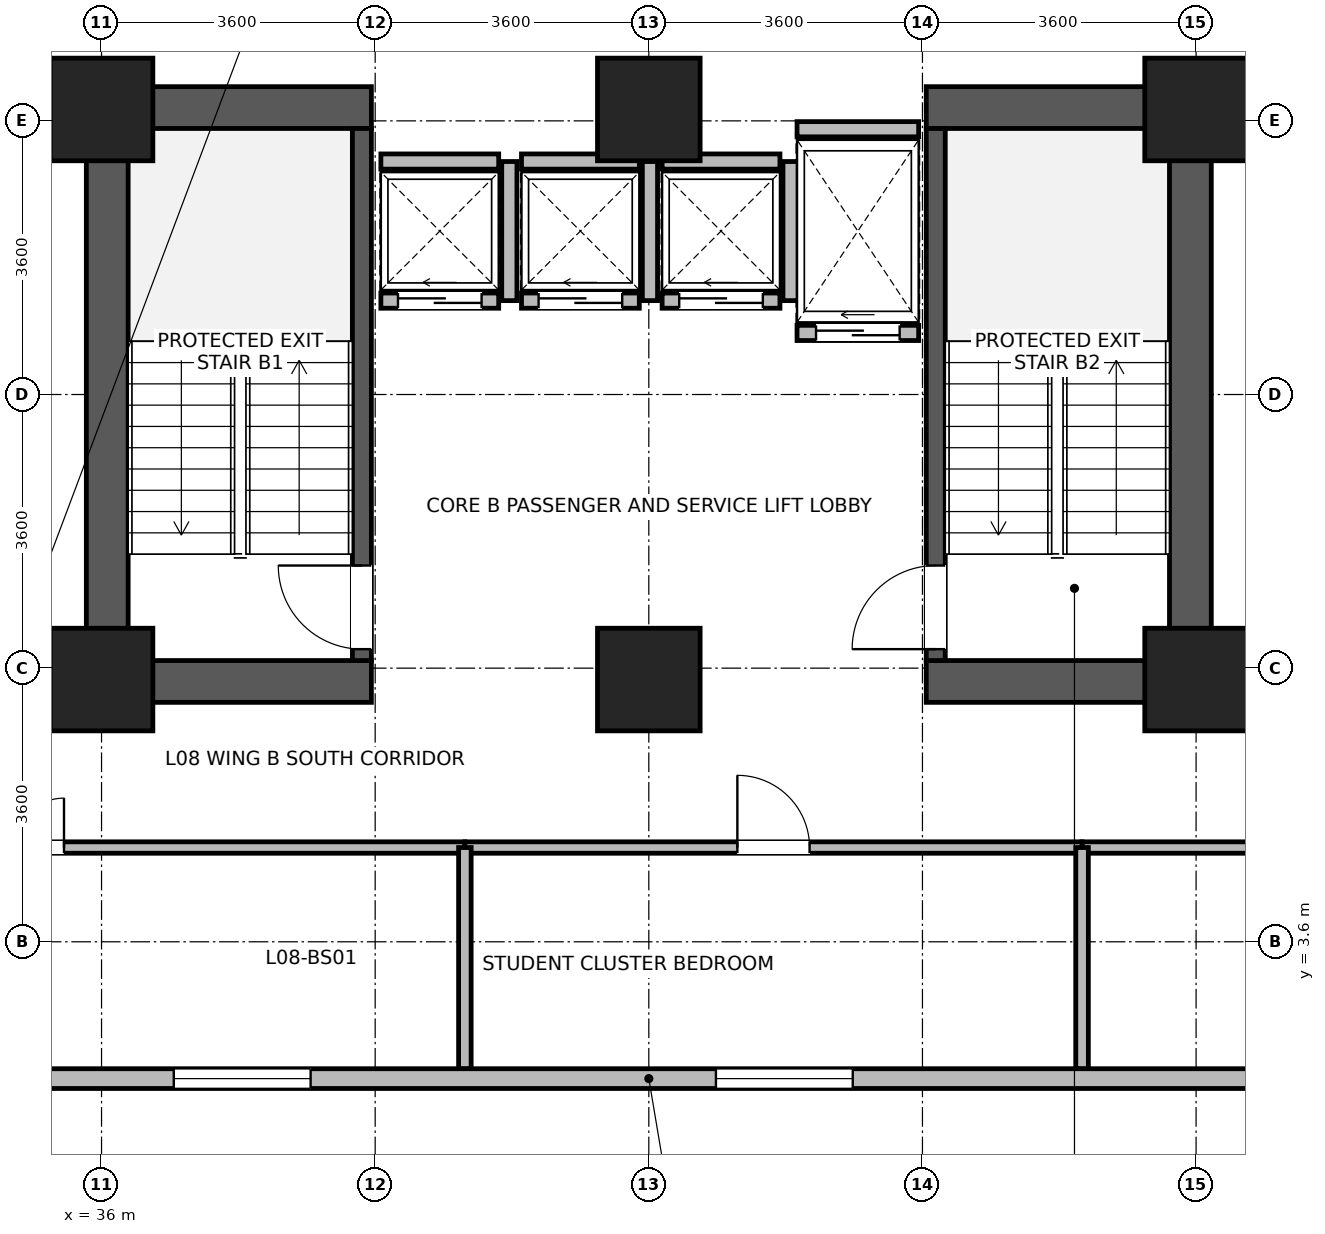
"""IFC4 building model, lengths in metres.
Left out: names, types, materials, properties, quantities, classifications, styles, units other than length and angle.
Written with IfcOpenShell. Run it as: python <this file> out.ifc"""

import sys

from ifc_helpers import new_model, si_unit, direction, frame, frame_2d, origin, origin_2d, place, context, subcontext, project, spatial, rectangle, extrude, source, transform, mapped, element, fill, save


model = new_model("IFC4")
c1 = context("Model", 3, precision=1e-05, world=origin(), true_north=direction((0.0, 1.0)))
c2 = subcontext(c1, "Body", "Model", "MODEL_VIEW")
j1 = project(units=[si_unit("LENGTHUNIT", "METRE"), si_unit("PLANEANGLEUNIT", "RADIAN")], contexts=[c1])
p1 = place(None, origin())
s1 = spatial("IfcSite", under=j1, at=p1, CompositionType="ELEMENT")
p2 = place(p1, origin())
s2 = spatial("IfcBuilding", under=s1, at=p2, CompositionType="ELEMENT")
p3 = place(p2, frame((0.0, 0.0, 36.4)))
s3 = spatial("IfcBuildingStorey", under=s2, at=p3, CompositionType="ELEMENT", Elevation=36.4)
for number, where, z_axis, x_axis in (
    (1, (36.075, 6.75, 0.0), (0.0, 0.0, 1.0), (0.0, 1.0, 0.0)),
    (2, (50.325, 6.75, 0.0), (0.0, 0.0, 1.0), (0.0, 1.0, 0.0)),
):
    element("IfcWall", number, at=place(p3, frame(where, z_axis=z_axis, x_axis=x_axis)), inside=s3, PredefinedType="SHEAR", context=c2, shape_type="SweptSolid", body=[
        extrude(rectangle(XDim=8.1, YDim=0.55, at=frame_2d((4.05, 0.0))), origin(), (0.0, 0.0, 1.0), 3.45),
    ])
for number, where, z_axis, x_axis in (
    (3, (36.35, 7.025, 0.0), (0.0, 0.0, 1.0), (1.0, 0.0, 0.0)),
    (4, (46.85, 7.025, 0.0), (0.0, 0.0, 1.0), (1.0, 0.0, 0.0)),
    (5, (36.35, 14.575, 0.0), (0.0, 0.0, 1.0), (1.0, 0.0, 0.0)),
    (6, (46.85, 14.575, 0.0), (0.0, 0.0, 1.0), (1.0, 0.0, 0.0)),
):
    element("IfcWall", number, at=place(p3, frame(where, z_axis=z_axis, x_axis=x_axis)), inside=s3, PredefinedType="SHEAR", context=c2, shape_type="SweptSolid", body=[
        extrude(rectangle(XDim=3.2, YDim=0.55, at=frame_2d((1.6, 0.0))), origin(), (0.0, 0.0, 1.0), 3.45),
    ])
p4 = place(p3, frame((39.425, 7.3, 0.0), z_axis=(0.0, 0.0, 1.0), x_axis=(0.0, 1.0, 0.0)))
e7 = element("IfcWall", 7, at=p4, inside=s3, PredefinedType="SHEAR", context=c2, shape_type="SweptSolid", body=[
    extrude(rectangle(XDim=7.0, YDim=0.25, at=frame_2d((3.5, 0.0))), origin(), (0.0, 0.0, 1.0), 3.45),
])
p5 = place(p4, frame((0.15, 0.0, 0.0)))
e8 = element("IfcOpeningElement", 8, at=p5, cuts=e7, PredefinedType="OPENING", context=c2, shape_type="SweptSolid", body=[
    extrude(rectangle(XDim=1.1, YDim=2.08, at=frame_2d((0.55, 1.04))), frame((0.0, 0.135, 0.0), z_axis=(0.0, -1.0, 0.0), x_axis=(1.0, 0.0, 0.0)), (0.0, 0.0, 1.0), 0.27),
])
p6 = place(p3, frame((46.975, 7.3, 0.0), z_axis=(0.0, 0.0, 1.0), x_axis=(0.0, 1.0, 0.0)))
e9 = element("IfcWall", 9, at=p6, inside=s3, PredefinedType="SHEAR", context=c2, shape_type="SweptSolid", body=[
    extrude(rectangle(XDim=7.0, YDim=0.25, at=frame_2d((3.5, 0.0))), origin(), (0.0, 0.0, 1.0), 3.45),
])
p7 = place(p6, frame((0.15, 0.0, 0.0)))
e10 = element("IfcOpeningElement", 10, at=p7, cuts=e9, PredefinedType="OPENING", context=c2, shape_type="SweptSolid", body=[
    extrude(rectangle(XDim=1.1, YDim=2.08, at=frame_2d((0.55, 1.04))), frame((0.0, 0.135, 0.0), z_axis=(0.0, -1.0, 0.0), x_axis=(1.0, 0.0, 0.0)), (0.0, 0.0, 1.0), 0.27),
])
m1 = source(origin(), c2, "Body", "SweptSolid", [
    extrude(rectangle(XDim=1.35, YDim=1.35, at=origin_2d()), origin(), (0.0, 0.0, 1.0), 3.7),
])
for number, where, z_axis, x_axis in (
    (11, (36.0, 7.05, 0.0), (0.0, 0.0, 1.0), (1.0, 0.0, 0.0)),
    (12, (36.0, 14.55, 0.0), (0.0, 0.0, 1.0), (1.0, 0.0, 0.0)),
    (13, (43.2, 7.05, 0.0), (0.0, 0.0, 1.0), (1.0, 0.0, 0.0)),
    (14, (43.2, 14.55, 0.0), (0.0, 0.0, 1.0), (1.0, 0.0, 0.0)),
    (15, (50.4, 7.05, 0.0), (0.0, 0.0, 1.0), (1.0, 0.0, 0.0)),
    (16, (50.4, 14.55, 0.0), (0.0, 0.0, 1.0), (1.0, 0.0, 0.0)),
):
    element("IfcColumn", number, at=place(p3, frame(where, z_axis=z_axis, x_axis=x_axis)), inside=s3, PredefinedType="COLUMN", context=c2, shape_type="MappedRepresentation", body=[
        mapped(m1, transform((0.0, 0.0, 0.0), x_axis=(1.0, 0.0, 0.0), y_axis=(0.0, 1.0, 0.0), z_axis=(0.0, 0.0, 1.0), scale=1.0)),
    ])
p8 = place(p3, frame((57.465, 1.8, 0.0), z_axis=(0.0, 0.0, 1.0), x_axis=(-1.0, 0.0, 0.0)))
e17 = element("IfcWall", 17, at=p8, inside=s3, PredefinedType="STANDARD", context=c2, shape_type="SweptSolid", body=[
    extrude(rectangle(XDim=28.53, YDim=0.26, at=frame_2d((14.265, 0.0))), origin(), (0.0, 0.0, 1.0), 3.43),
])
p9 = place(p8, frame((0.883, 0.0, 0.85)))
e18 = element("IfcOpeningElement", 18, at=p9, cuts=e17, PredefinedType="OPENING", context=c2, shape_type="SweptSolid", body=[
    extrude(rectangle(XDim=1.8, YDim=1.85, at=frame_2d((0.9, 0.925))), frame((0.0, 0.14, 0.0), z_axis=(0.0, -1.0, 0.0), x_axis=(1.0, 0.0, 0.0)), (0.0, 0.0, 1.0), 0.28),
])
p10 = place(p8, frame((4.449, 0.0, 0.85)))
e19 = element("IfcOpeningElement", 19, at=p10, cuts=e17, PredefinedType="OPENING", context=c2, shape_type="SweptSolid", body=[
    extrude(rectangle(XDim=1.8, YDim=1.85, at=frame_2d((0.9, 0.925))), frame((0.0, 0.14, 0.0), z_axis=(0.0, -1.0, 0.0), x_axis=(1.0, 0.0, 0.0)), (0.0, 0.0, 1.0), 0.28),
])
p11 = place(p8, frame((11.582, 0.0, 0.85)))
e20 = element("IfcOpeningElement", 20, at=p11, cuts=e17, PredefinedType="OPENING", context=c2, shape_type="SweptSolid", body=[
    extrude(rectangle(XDim=1.8, YDim=1.85, at=frame_2d((0.9, 0.925))), frame((0.0, 0.14, 0.0), z_axis=(0.0, -1.0, 0.0), x_axis=(1.0, 0.0, 0.0)), (0.0, 0.0, 1.0), 0.28),
])
p12 = place(p8, frame((18.714, 0.0, 0.85)))
e21 = element("IfcOpeningElement", 21, at=p12, cuts=e17, PredefinedType="OPENING", context=c2, shape_type="SweptSolid", body=[
    extrude(rectangle(XDim=1.8, YDim=1.85, at=frame_2d((0.9, 0.925))), frame((0.0, 0.14, 0.0), z_axis=(0.0, -1.0, 0.0), x_axis=(1.0, 0.0, 0.0)), (0.0, 0.0, 1.0), 0.28),
])
p13 = place(p8, frame((22.281, 0.0, 0.85)))
e22 = element("IfcOpeningElement", 22, at=p13, cuts=e17, PredefinedType="OPENING", context=c2, shape_type="SweptSolid", body=[
    extrude(rectangle(XDim=1.8, YDim=1.85, at=frame_2d((0.9, 0.925))), frame((0.0, 0.14, 0.0), z_axis=(0.0, -1.0, 0.0), x_axis=(1.0, 0.0, 0.0)), (0.0, 0.0, 1.0), 0.28),
])
p14 = place(p8, frame((25.847, 0.0, 0.85)))
e23 = element("IfcOpeningElement", 23, at=p14, cuts=e17, PredefinedType="OPENING", context=c2, shape_type="SweptSolid", body=[
    extrude(rectangle(XDim=1.8, YDim=1.85, at=frame_2d((0.9, 0.925))), frame((0.0, 0.14, 0.0), z_axis=(0.0, -1.0, 0.0), x_axis=(1.0, 0.0, 0.0)), (0.0, 0.0, 1.0), 0.28),
])
p15 = place(p3, frame((39.675, 12.035, 0.0), z_axis=(0.0, 0.0, 1.0), x_axis=(1.0, 0.0, 0.0)))
e24 = element("IfcWall", 24, at=p15, inside=s3, PredefinedType="PARTITIONING", context=c2, shape_type="SweptSolid", body=[
    extrude(rectangle(XDim=1.55, YDim=0.2, at=frame_2d((0.775, 0.0))), origin(), (0.0, 0.0, 1.0), 3.43),
])
p16 = place(p15, frame((0.225, 0.0, 0.0)))
e25 = element("IfcOpeningElement", 25, at=p16, cuts=e24, PredefinedType="OPENING", context=c2, shape_type="SweptSolid", body=[
    extrude(rectangle(XDim=1.1, YDim=2.12, at=frame_2d((0.55, 1.06))), frame((0.0, 0.11, 0.0), z_axis=(0.0, -1.0, 0.0), x_axis=(1.0, 0.0, 0.0)), (0.0, 0.0, 1.0), 0.22),
])
p17 = place(p3, frame((39.675, 13.865, 0.0), z_axis=(0.0, 0.0, 1.0), x_axis=(1.0, 0.0, 0.0)))
e26 = element("IfcWall", 26, at=p17, inside=s3, PredefinedType="PARTITIONING", context=c2, shape_type="SweptSolid", body=[
    extrude(rectangle(XDim=1.55, YDim=0.2, at=frame_2d((0.775, 0.0))), origin(), (0.0, 0.0, 1.0), 3.43),
])
p18 = place(p3, frame((41.365, 12.035, 0.0), z_axis=(0.0, 0.0, 1.0), x_axis=(0.0, 1.0, 0.0)))
e27 = element("IfcWall", 27, at=p18, inside=s3, PredefinedType="PARTITIONING", context=c2, shape_type="SweptSolid", body=[
    extrude(rectangle(XDim=1.83, YDim=0.2, at=frame_2d((0.915, 0.0))), origin(), (0.0, 0.0, 1.0), 3.43),
])
p19 = place(p3, frame((41.525, 12.035, 0.0), z_axis=(0.0, 0.0, 1.0), x_axis=(1.0, 0.0, 0.0)))
e28 = element("IfcWall", 28, at=p19, inside=s3, PredefinedType="PARTITIONING", context=c2, shape_type="SweptSolid", body=[
    extrude(rectangle(XDim=1.55, YDim=0.2, at=frame_2d((0.775, 0.0))), origin(), (0.0, 0.0, 1.0), 3.43),
])
p20 = place(p19, frame((0.225, 0.0, 0.0)))
e29 = element("IfcOpeningElement", 29, at=p20, cuts=e28, PredefinedType="OPENING", context=c2, shape_type="SweptSolid", body=[
    extrude(rectangle(XDim=1.1, YDim=2.12, at=frame_2d((0.55, 1.06))), frame((0.0, 0.11, 0.0), z_axis=(0.0, -1.0, 0.0), x_axis=(1.0, 0.0, 0.0)), (0.0, 0.0, 1.0), 0.22),
])
p21 = place(p3, frame((41.525, 13.865, 0.0), z_axis=(0.0, 0.0, 1.0), x_axis=(1.0, 0.0, 0.0)))
e30 = element("IfcWall", 30, at=p21, inside=s3, PredefinedType="PARTITIONING", context=c2, shape_type="SweptSolid", body=[
    extrude(rectangle(XDim=1.55, YDim=0.2, at=frame_2d((0.775, 0.0))), origin(), (0.0, 0.0, 1.0), 3.43),
])
p22 = place(p3, frame((43.215, 12.035, 0.0), z_axis=(0.0, 0.0, 1.0), x_axis=(0.0, 1.0, 0.0)))
e31 = element("IfcWall", 31, at=p22, inside=s3, PredefinedType="PARTITIONING", context=c2, shape_type="SweptSolid", body=[
    extrude(rectangle(XDim=1.83, YDim=0.2, at=frame_2d((0.915, 0.0))), origin(), (0.0, 0.0, 1.0), 3.43),
])
p23 = place(p3, frame((43.375, 12.035, 0.0), z_axis=(0.0, 0.0, 1.0), x_axis=(1.0, 0.0, 0.0)))
e32 = element("IfcWall", 32, at=p23, inside=s3, PredefinedType="PARTITIONING", context=c2, shape_type="SweptSolid", body=[
    extrude(rectangle(XDim=1.55, YDim=0.2, at=frame_2d((0.775, 0.0))), origin(), (0.0, 0.0, 1.0), 3.43),
])
p24 = place(p23, frame((0.225, 0.0, 0.0)))
e33 = element("IfcOpeningElement", 33, at=p24, cuts=e32, PredefinedType="OPENING", context=c2, shape_type="SweptSolid", body=[
    extrude(rectangle(XDim=1.1, YDim=2.12, at=frame_2d((0.55, 1.06))), frame((0.0, 0.11, 0.0), z_axis=(0.0, -1.0, 0.0), x_axis=(1.0, 0.0, 0.0)), (0.0, 0.0, 1.0), 0.22),
])
p25 = place(p3, frame((43.375, 13.865, 0.0), z_axis=(0.0, 0.0, 1.0), x_axis=(1.0, 0.0, 0.0)))
e34 = element("IfcWall", 34, at=p25, inside=s3, PredefinedType="PARTITIONING", context=c2, shape_type="SweptSolid", body=[
    extrude(rectangle(XDim=1.55, YDim=0.2, at=frame_2d((0.775, 0.0))), origin(), (0.0, 0.0, 1.0), 3.43),
])
p26 = place(p3, frame((45.065, 12.035, 0.0), z_axis=(0.0, 0.0, 1.0), x_axis=(0.0, 1.0, 0.0)))
e35 = element("IfcWall", 35, at=p26, inside=s3, PredefinedType="PARTITIONING", context=c2, shape_type="SweptSolid", body=[
    extrude(rectangle(XDim=1.83, YDim=0.2, at=frame_2d((0.915, 0.0))), origin(), (0.0, 0.0, 1.0), 3.43),
])
p27 = place(p3, frame((45.15, 11.61, 0.0), z_axis=(0.0, 0.0, 1.0), x_axis=(1.0, 0.0, 0.0)))
e36 = element("IfcWall", 36, at=p27, inside=s3, PredefinedType="PARTITIONING", context=c2, shape_type="SweptSolid", body=[
    extrude(rectangle(XDim=1.6, YDim=0.2, at=frame_2d((0.8, 0.0))), origin(), (0.0, 0.0, 1.0), 3.43),
])
p28 = place(p27, frame((0.25, 0.0, 0.0)))
e37 = element("IfcOpeningElement", 37, at=p28, cuts=e36, PredefinedType="OPENING", context=c2, shape_type="SweptSolid", body=[
    extrude(rectangle(XDim=1.1, YDim=2.12, at=frame_2d((0.55, 1.06))), frame((0.0, 0.11, 0.0), z_axis=(0.0, -1.0, 0.0), x_axis=(1.0, 0.0, 0.0)), (0.0, 0.0, 1.0), 0.22),
])
p29 = place(p3, frame((45.15, 14.29, 0.0), z_axis=(0.0, 0.0, 1.0), x_axis=(1.0, 0.0, 0.0)))
e38 = element("IfcWall", 38, at=p29, inside=s3, PredefinedType="PARTITIONING", context=c2, shape_type="SweptSolid", body=[
    extrude(rectangle(XDim=1.6, YDim=0.2, at=frame_2d((0.8, 0.0))), origin(), (0.0, 0.0, 1.0), 2.23),
])
p30 = place(p3, frame((28.932, 4.84, 0.0), z_axis=(0.0, 0.0, 1.0), x_axis=(1.0, 0.0, 0.0)))
e39 = element("IfcWall", 39, at=p30, inside=s3, PredefinedType="PARTITIONING", context=c2, shape_type="SweptSolid", body=[
    extrude(rectangle(XDim=11.848, YDim=0.15, at=frame_2d((5.924, 0.0))), origin(), (0.0, 0.0, 1.0), 3.43),
])
p31 = place(p30, frame((5.274, 0.0, 0.0)))
e40 = element("IfcOpeningElement", 40, at=p31, cuts=e39, PredefinedType="OPENING", context=c2, shape_type="SweptSolid", body=[
    extrude(rectangle(XDim=1.3, YDim=2.12, at=frame_2d((0.65, 1.06))), frame((0.0, 0.085, 0.0), z_axis=(0.0, -1.0, 0.0), x_axis=(1.0, 0.0, 0.0)), (0.0, 0.0, 1.0), 0.17),
])
p32 = place(p3, frame((48.9, 4.84, 0.0), z_axis=(0.0, 0.0, 1.0), x_axis=(1.0, 0.0, 0.0)))
e41 = element("IfcWall", 41, at=p32, inside=s3, PredefinedType="PARTITIONING", context=c2, shape_type="SweptSolid", body=[
    extrude(rectangle(XDim=8.568, YDim=0.15, at=frame_2d((4.284, 0.0))), origin(), (0.0, 0.0, 1.0), 3.43),
])
p33 = place(p32, frame((3.809, 0.0, 0.0)))
e42 = element("IfcOpeningElement", 42, at=p33, cuts=e41, PredefinedType="OPENING", context=c2, shape_type="SweptSolid", body=[
    extrude(rectangle(XDim=0.95, YDim=2.1, at=frame_2d((0.475, 1.05))), frame((0.0, 0.085, 0.0), z_axis=(0.0, -1.0, 0.0), x_axis=(1.0, 0.0, 0.0)), (0.0, 0.0, 1.0), 0.17),
])
p34 = place(p3, frame((40.78, 4.84, 0.0), z_axis=(0.0, 0.0, 1.0), x_axis=(1.0, 0.0, 0.0)))
e43 = element("IfcWall", 43, at=p34, inside=s3, PredefinedType="PARTITIONING", context=c2, shape_type="SweptSolid", body=[
    extrude(rectangle(XDim=8.12, YDim=0.15, at=frame_2d((4.06, 0.0))), origin(), (0.0, 0.0, 1.0), 3.43),
])
p35 = place(p34, frame((3.585, 0.0, 0.0)))
e44 = element("IfcOpeningElement", 44, at=p35, cuts=e43, PredefinedType="OPENING", context=c2, shape_type="SweptSolid", body=[
    extrude(rectangle(XDim=0.95, YDim=2.1, at=frame_2d((0.475, 1.05))), frame((0.0, 0.085, 0.0), z_axis=(0.0, -1.0, 0.0), x_axis=(1.0, 0.0, 0.0)), (0.0, 0.0, 1.0), 0.17),
])
for number, where, z_axis, x_axis in (
    (45, (40.78, 1.932, 0.0), (0.0, 0.0, 1.0), (0.0, 1.0, 0.0)),
    (46, (48.9, 1.932, 0.0), (0.0, 0.0, 1.0), (0.0, 1.0, 0.0)),
):
    element("IfcWall", number, at=place(p3, frame(where, z_axis=z_axis, x_axis=x_axis)), inside=s3, PredefinedType="PARTITIONING", context=c2, shape_type="SweptSolid", body=[
        extrude(rectangle(XDim=2.908, YDim=0.165, at=frame_2d((1.454, 0.0))), origin(), (0.0, 0.0, 1.0), 3.43),
    ])
p36 = place(p11, origin())
e47 = element("IfcWindow", 47, at=p36, inside=s3, PartitioningType="SINGLE_PANEL", PredefinedType="WINDOW", context=c2, shape_type="SweptSolid", body=[
    extrude(rectangle(XDim=1.8, YDim=1.85, at=frame_2d((0.9, 0.925))), frame((0.0, 0.03, 0.0), z_axis=(0.0, -1.0, 0.0), x_axis=(1.0, 0.0, 0.0)), (0.0, 0.0, 1.0), 0.06),
])
fill(e20, e47)
p37 = place(p12, origin())
e48 = element("IfcWindow", 48, at=p37, inside=s3, PartitioningType="SINGLE_PANEL", PredefinedType="WINDOW", context=c2, shape_type="SweptSolid", body=[
    extrude(rectangle(XDim=1.8, YDim=1.85, at=frame_2d((0.9, 0.925))), frame((0.0, 0.03, 0.0), z_axis=(0.0, -1.0, 0.0), x_axis=(1.0, 0.0, 0.0)), (0.0, 0.0, 1.0), 0.06),
])
fill(e21, e48)
p38 = place(p5, origin())
e49 = element("IfcDoor", 49, at=p38, inside=s3, OperationType="SINGLE_SWING_RIGHT", PredefinedType="DOOR", context=c2, shape_type="SweptSolid", body=[
    extrude(rectangle(XDim=1.1, YDim=2.08, at=frame_2d((0.55, 1.04))), frame((0.0, 0.025, 0.0), z_axis=(0.0, -1.0, 0.0), x_axis=(1.0, 0.0, 0.0)), (0.0, 0.0, 1.0), 0.05),
])
fill(e8, e49)
p39 = place(p7, origin())
e50 = element("IfcDoor", 50, at=p39, inside=s3, OperationType="SINGLE_SWING_LEFT", PredefinedType="DOOR", context=c2, shape_type="SweptSolid", body=[
    extrude(rectangle(XDim=1.1, YDim=2.08, at=frame_2d((0.55, 1.04))), frame((0.0, 0.025, 0.0), z_axis=(0.0, -1.0, 0.0), x_axis=(1.0, 0.0, 0.0)), (0.0, 0.0, 1.0), 0.05),
])
fill(e10, e50)
p40 = place(p16, origin())
e51 = element("IfcDoor", 51, at=p40, inside=s3, OperationType="SLIDING_TO_LEFT", PredefinedType="DOOR", context=c2, shape_type="SweptSolid", body=[
    extrude(rectangle(XDim=1.1, YDim=2.12, at=frame_2d((0.55, 1.06))), frame((0.0, 0.025, 0.0), z_axis=(0.0, -1.0, 0.0), x_axis=(1.0, 0.0, 0.0)), (0.0, 0.0, 1.0), 0.05),
])
fill(e25, e51)
p41 = place(p20, origin())
e52 = element("IfcDoor", 52, at=p41, inside=s3, OperationType="SLIDING_TO_LEFT", PredefinedType="DOOR", context=c2, shape_type="SweptSolid", body=[
    extrude(rectangle(XDim=1.1, YDim=2.12, at=frame_2d((0.55, 1.06))), frame((0.0, 0.025, 0.0), z_axis=(0.0, -1.0, 0.0), x_axis=(1.0, 0.0, 0.0)), (0.0, 0.0, 1.0), 0.05),
])
fill(e29, e52)
p42 = place(p24, origin())
e53 = element("IfcDoor", 53, at=p42, inside=s3, OperationType="SLIDING_TO_LEFT", PredefinedType="DOOR", context=c2, shape_type="SweptSolid", body=[
    extrude(rectangle(XDim=1.1, YDim=2.12, at=frame_2d((0.55, 1.06))), frame((0.0, 0.025, 0.0), z_axis=(0.0, -1.0, 0.0), x_axis=(1.0, 0.0, 0.0)), (0.0, 0.0, 1.0), 0.05),
])
fill(e33, e53)
p43 = place(p28, origin())
e54 = element("IfcDoor", 54, at=p43, inside=s3, OperationType="SLIDING_TO_LEFT", PredefinedType="DOOR", context=c2, shape_type="SweptSolid", body=[
    extrude(rectangle(XDim=1.1, YDim=2.12, at=frame_2d((0.55, 1.06))), frame((0.0, 0.025, 0.0), z_axis=(0.0, -1.0, 0.0), x_axis=(1.0, 0.0, 0.0)), (0.0, 0.0, 1.0), 0.05),
])
fill(e37, e54)
p44 = place(p31, origin())
e55 = element("IfcDoor", 55, at=p44, inside=s3, OperationType="DOUBLE_DOOR_SINGLE_SWING", PredefinedType="DOOR", context=c2, shape_type="SweptSolid", body=[
    extrude(rectangle(XDim=1.3, YDim=2.12, at=frame_2d((0.65, 1.06))), frame((0.0, 0.025, 0.0), z_axis=(0.0, -1.0, 0.0), x_axis=(1.0, 0.0, 0.0)), (0.0, 0.0, 1.0), 0.05),
])
fill(e40, e55)
p45 = place(p35, origin())
e56 = element("IfcDoor", 56, at=p45, inside=s3, OperationType="SINGLE_SWING_LEFT", PredefinedType="DOOR", context=c2, shape_type="SweptSolid", body=[
    extrude(rectangle(XDim=0.95, YDim=2.1, at=frame_2d((0.475, 1.05))), frame((0.0, 0.025, 0.0), z_axis=(0.0, -1.0, 0.0), x_axis=(1.0, 0.0, 0.0)), (0.0, 0.0, 1.0), 0.05),
])
fill(e44, e56)
save(model, sys.argv[1])
